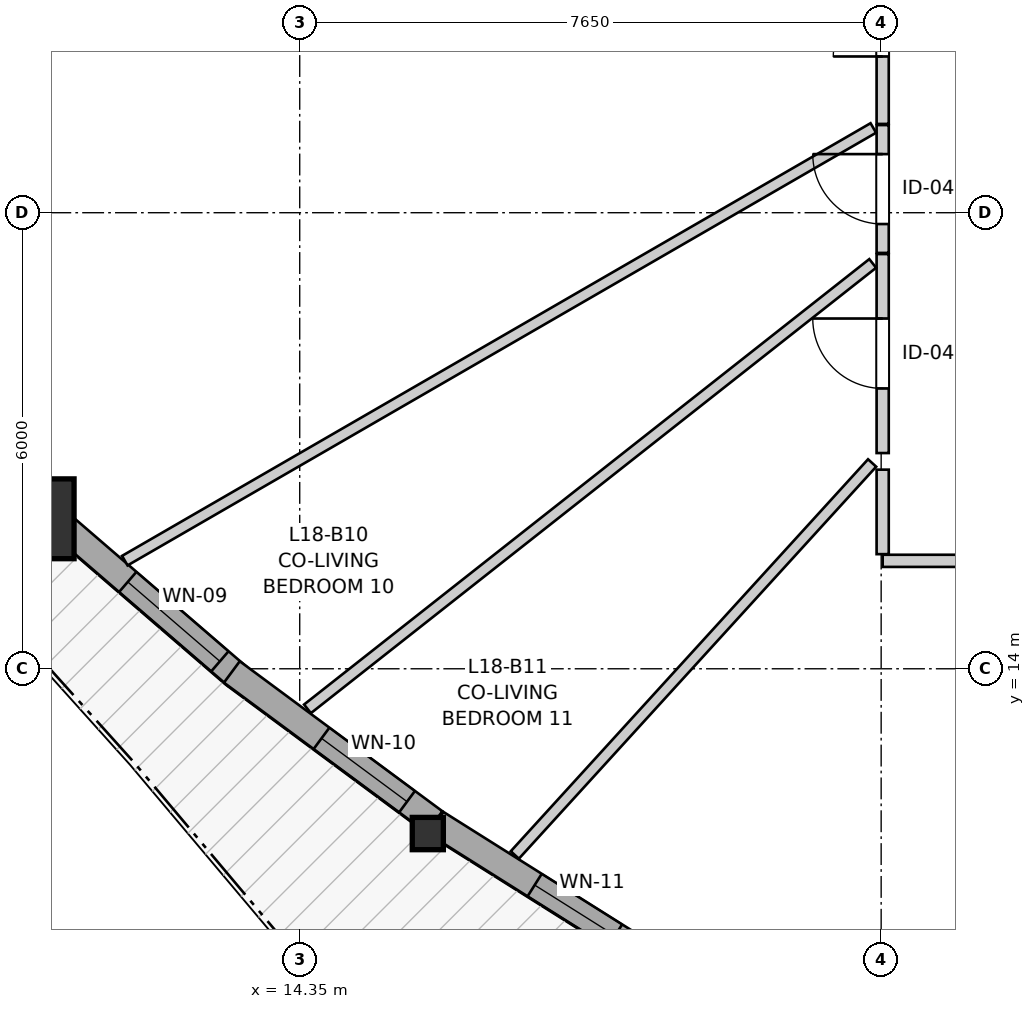
"""IFC4 building model, lengths in metres.
Left out: names, types, materials, properties, quantities, classifications, styles, units other than length and angle.
Written with IfcOpenShell. Run it as: python <this file> out.ifc"""

import sys

from ifc_helpers import new_model, si_unit, direction, frame, frame_2d, origin, origin_2d, place, context, subcontext, project, spatial, rectangle, i_section, extrude, source, transform, mapped, element, fill, save


model = new_model("IFC4")
c1 = context("Model", 3, precision=1e-05, world=origin(), true_north=direction((0.0, 1.0)))
c2 = subcontext(c1, "Body", "Model", "MODEL_VIEW")
j1 = project(units=[si_unit("LENGTHUNIT", "METRE"), si_unit("PLANEANGLEUNIT", "RADIAN")], contexts=[c1])
p1 = place(None, origin())
s1 = spatial("IfcSite", under=j1, at=p1, CompositionType="ELEMENT")
p2 = place(p1, origin())
s2 = spatial("IfcBuilding", under=s1, at=p2, CompositionType="ELEMENT")
p3 = place(p2, frame((0.0, 0.0, 62.2)))
s3 = spatial("IfcBuildingStorey", under=s2, at=p3, CompositionType="ELEMENT", Elevation=62.2)
m1 = source(origin(), c2, "Body", "SweptSolid", [
    extrude(rectangle(XDim=1.05, YDim=1.05, at=origin_2d()), origin(), (0.0, 0.0, 1.0), 2.9),
])
p4 = place(p3, frame((10.856, 15.973, 0.0), z_axis=(0.0, 0.0, 1.0), x_axis=(1.0, 0.0, 0.0)))
e1 = element("IfcColumn", 1, at=p4, inside=s3, PredefinedType="COLUMN", context=c2, shape_type="MappedRepresentation", body=[
    mapped(m1, transform((0.0, 0.0, 0.0), x_axis=(1.0, 0.0, 0.0), y_axis=(0.0, 1.0, 0.0), z_axis=(0.0, 0.0, 1.0), scale=1.0)),
])
m2 = source(origin(), c2, "Body", "SweptSolid", [
    extrude(i_section(OverallWidth=0.409, OverallDepth=0.425, WebThickness=0.03, FlangeThickness=0.048, FilletRadius=0.015, at=origin_2d()), origin(), (0.0, 0.0, 1.0), 2.9),
])
p5 = place(p3, frame((16.035, 11.832, 0.0), z_axis=(0.0, 0.0, 1.0), x_axis=(1.0, 0.0, 0.0)))
e2 = element("IfcColumn", 2, at=p5, inside=s3, PredefinedType="PILASTER", context=c2, shape_type="MappedRepresentation", body=[
    mapped(m2, transform((0.0, 0.0, 0.0), x_axis=(1.0, 0.0, 0.0), y_axis=(0.0, 1.0, 0.0), z_axis=(0.0, 0.0, 1.0), scale=1.0)),
])
p6 = place(p3, frame((11.198, 15.91, 0.0), z_axis=(0.0, 0.0, 1.0), x_axis=(0.757460062477, -0.652881500544, 0.0)))
e3 = element("IfcWall", 3, at=p6, inside=s3, PredefinedType="SOLIDWALL", context=c2, shape_type="SweptSolid", body=[
    extrude(rectangle(XDim=3.074, YDim=0.35, at=frame_2d((1.537, 0.0))), origin(), (0.0, 0.0, 1.0), 2.38),
])
p7 = place(p6, frame((1.175, 0.0, 0.82)))
e4 = element("IfcOpeningElement", 4, at=p7, cuts=e3, PredefinedType="OPENING", context=c2, shape_type="SweptSolid", body=[
    extrude(rectangle(XDim=1.6, YDim=1.35, at=frame_2d((0.8, 0.675))), frame((0.0, 0.185, 0.0), z_axis=(0.0, -1.0, 0.0), x_axis=(1.0, 0.0, 0.0)), (0.0, 0.0, 1.0), 0.37),
])
p8 = place(p3, frame((13.457, 13.958, 0.0), z_axis=(0.0, 0.0, 1.0), x_axis=(0.803790514758, -0.594912437578, 0.0)))
e5 = element("IfcWall", 5, at=p8, inside=s3, PredefinedType="SOLIDWALL", context=c2, shape_type="SweptSolid", body=[
    extrude(rectangle(XDim=3.317, YDim=0.35, at=frame_2d((1.659, 0.0))), origin(), (0.0, 0.0, 1.0), 2.38),
])
p9 = place(p8, frame((1.468, 0.0, 0.82)))
e6 = element("IfcOpeningElement", 6, at=p9, cuts=e5, PredefinedType="OPENING", context=c2, shape_type="SweptSolid", body=[
    extrude(rectangle(XDim=1.4, YDim=1.35, at=frame_2d((0.7, 0.675))), frame((0.0, 0.185, 0.0), z_axis=(0.0, -1.0, 0.0), x_axis=(1.0, 0.0, 0.0)), (0.0, 0.0, 1.0), 0.37),
])
p10 = place(p3, frame((16.146, 11.97, 0.0), z_axis=(0.0, 0.0, 1.0), x_axis=(0.846405860611, -0.532538373381, 0.0)))
e7 = element("IfcWall", 7, at=p10, inside=s3, PredefinedType="SOLIDWALL", context=c2, shape_type="SweptSolid", body=[
    extrude(rectangle(XDim=3.298, YDim=0.35, at=frame_2d((1.649, 0.0))), origin(), (0.0, 0.0, 1.0), 2.38),
])
p11 = place(p10, frame((1.531, 0.0, 0.82)))
e8 = element("IfcOpeningElement", 8, at=p11, cuts=e7, PredefinedType="OPENING", context=c2, shape_type="SweptSolid", body=[
    extrude(rectangle(XDim=1.25, YDim=1.35, at=frame_2d((0.625, 0.675))), frame((0.0, 0.185, 0.0), z_axis=(0.0, -1.0, 0.0), x_axis=(1.0, 0.0, 0.0)), (0.0, 0.0, 1.0), 0.37),
])
p12 = place(p3, frame((28.596, 15.42, 0.0), z_axis=(0.0, 0.0, 1.0), x_axis=(-1.0, 0.0, 0.0)))
e9 = element("IfcWall", 9, at=p12, inside=s3, PredefinedType="PARTITIONING", context=c2, shape_type="SweptSolid", body=[
    extrude(rectangle(XDim=6.576, YDim=0.16, at=frame_2d((3.288, 0.0))), origin(), (0.0, 0.0, 1.0), 2.9),
])
p13 = place(p12, frame((2.646, 0.0, 0.0)))
e10 = element("IfcOpeningElement", 10, at=p13, cuts=e9, PredefinedType="OPENING", context=c2, shape_type="SweptSolid", body=[
    extrude(rectangle(XDim=1.3, YDim=2.1, at=frame_2d((0.65, 1.05))), frame((0.0, 0.09, 0.0), z_axis=(0.0, -1.0, 0.0), x_axis=(1.0, 0.0, 0.0)), (0.0, 0.0, 1.0), 0.18),
])
p14 = place(p3, frame((22.02, 21.168, 0.0), z_axis=(0.0, 0.0, 1.0), x_axis=(0.0, 1.0, 0.0)))
e11 = element("IfcWall", 11, at=p14, inside=s3, PredefinedType="PARTITIONING", context=c2, shape_type="SweptSolid", body=[
    extrude(rectangle(XDim=2.982, YDim=0.16, at=frame_2d((1.491, 0.0))), origin(), (0.0, 0.0, 1.0), 2.9),
])
p15 = place(p14, frame((0.887, 0.0, 0.0)))
e12 = element("IfcOpeningElement", 12, at=p15, cuts=e11, PredefinedType="OPENING", context=c2, shape_type="SweptSolid", body=[
    extrude(rectangle(XDim=1.3, YDim=2.1, at=frame_2d((0.65, 1.05))), frame((0.0, 0.09, 0.0), z_axis=(0.0, -1.0, 0.0), x_axis=(1.0, 0.0, 0.0)), (0.0, 0.0, 1.0), 0.18),
])
p16 = place(p3, frame((22.02, 16.838, 0.0), z_axis=(0.0, 0.0, 1.0), x_axis=(0.0, 1.0, 0.0)))
e13 = element("IfcWall", 13, at=p16, inside=s3, PredefinedType="PARTITIONING", context=c2, shape_type="SweptSolid", body=[
    extrude(rectangle(XDim=2.618, YDim=0.16, at=frame_2d((1.309, 0.0))), origin(), (0.0, 0.0, 1.0), 2.9),
])
p17 = place(p16, frame((0.85, 0.0, 0.0)))
e14 = element("IfcOpeningElement", 14, at=p17, cuts=e13, PredefinedType="OPENING", context=c2, shape_type="SweptSolid", body=[
    extrude(rectangle(XDim=0.92, YDim=2.1, at=frame_2d((0.46, 1.05))), frame((0.0, 0.09, 0.0), z_axis=(0.0, -1.0, 0.0), x_axis=(1.0, 0.0, 0.0)), (0.0, 0.0, 1.0), 0.18),
])
p18 = place(p3, frame((22.02, 19.471, 0.0), z_axis=(0.0, 0.0, 1.0), x_axis=(0.0, 1.0, 0.0)))
e15 = element("IfcWall", 15, at=p18, inside=s3, PredefinedType="PARTITIONING", context=c2, shape_type="SweptSolid", body=[
    extrude(rectangle(XDim=1.682, YDim=0.16, at=frame_2d((0.841, 0.0))), origin(), (0.0, 0.0, 1.0), 2.9),
])
p19 = place(p18, frame((0.38, 0.0, 0.0)))
e16 = element("IfcOpeningElement", 16, at=p19, cuts=e15, PredefinedType="OPENING", context=c2, shape_type="SweptSolid", body=[
    extrude(rectangle(XDim=0.92, YDim=2.1, at=frame_2d((0.46, 1.05))), frame((0.0, 0.09, 0.0), z_axis=(0.0, -1.0, 0.0), x_axis=(1.0, 0.0, 0.0)), (0.0, 0.0, 1.0), 0.18),
])
p20 = place(p3, frame((12.049, 15.422, 0.0), z_axis=(0.0, 0.0, 1.0), x_axis=(0.865775806306, 0.500432066534, 0.0)))
e17 = element("IfcWall", 17, at=p20, inside=s3, PredefinedType="PARTITIONING", context=c2, shape_type="SweptSolid", body=[
    extrude(rectangle(XDim=11.375, YDim=0.145, at=frame_2d((5.688, 0.0))), origin(), (0.0, 0.0, 1.0), 2.9),
])
p21 = place(p3, frame((14.452, 13.473, 0.0), z_axis=(0.0, 0.0, 1.0), x_axis=(0.785461283481, 0.618910794988, 0.0)))
e18 = element("IfcWall", 18, at=p21, inside=s3, PredefinedType="PARTITIONING", context=c2, shape_type="SweptSolid", body=[
    extrude(rectangle(XDim=9.468, YDim=0.145, at=frame_2d((4.734, 0.0))), origin(), (0.0, 0.0, 1.0), 2.9),
])
p22 = place(p3, frame((17.18, 11.55, 0.0), z_axis=(0.0, 0.0, 1.0), x_axis=(0.673657773225, 0.739043438895, 0.0)))
e19 = element("IfcWall", 19, at=p22, inside=s3, PredefinedType="PARTITIONING", context=c2, shape_type="SweptSolid", body=[
    extrude(rectangle(XDim=6.979, YDim=0.145, at=frame_2d((3.489, 0.0))), origin(), (0.0, 0.0, 1.0), 2.9),
])
p23 = place(p3, frame((22.02, 15.508, 0.0), z_axis=(0.0, 0.0, 1.0), x_axis=(0.0, 1.0, 0.0)))
e20 = element("IfcWall", 20, at=p23, inside=s3, PredefinedType="PARTITIONING", context=c2, shape_type="SweptSolid", body=[
    extrude(rectangle(XDim=1.112, YDim=0.16, at=frame_2d((0.556, 0.0))), origin(), (0.0, 0.0, 1.0), 2.9),
])
m3 = source(origin(), c2, "Body", "SweptSolid", [
    extrude(rectangle(XDim=1.6, YDim=1.35, at=frame_2d((0.8, 0.675))), frame((0.0, 0.03, 0.0), z_axis=(0.0, -1.0, 0.0), x_axis=(1.0, 0.0, 0.0)), (0.0, 0.0, 1.0), 0.06),
])
p24 = place(p7, origin())
e21 = element("IfcWindow", 21, at=p24, inside=s3, PartitioningType="SINGLE_PANEL", PredefinedType="WINDOW", context=c2, shape_type="MappedRepresentation", body=[
    mapped(m3, transform((0.0, 0.0, 0.0), x_axis=(1.0, 0.0, 0.0), y_axis=(0.0, 1.0, 0.0), z_axis=(0.0, 0.0, 1.0), scale=1.0)),
])
fill(e4, e21)
m4 = source(origin(), c2, "Body", "SweptSolid", [
    extrude(rectangle(XDim=1.4, YDim=1.35, at=frame_2d((0.7, 0.675))), frame((0.0, 0.03, 0.0), z_axis=(0.0, -1.0, 0.0), x_axis=(1.0, 0.0, 0.0)), (0.0, 0.0, 1.0), 0.06),
])
p25 = place(p9, origin())
e22 = element("IfcWindow", 22, at=p25, inside=s3, PartitioningType="SINGLE_PANEL", PredefinedType="WINDOW", context=c2, shape_type="MappedRepresentation", body=[
    mapped(m4, transform((0.0, 0.0, 0.0), x_axis=(1.0, 0.0, 0.0), y_axis=(0.0, 1.0, 0.0), z_axis=(0.0, 0.0, 1.0), scale=1.0)),
])
fill(e6, e22)
m5 = source(origin(), c2, "Body", "SweptSolid", [
    extrude(rectangle(XDim=1.25, YDim=1.35, at=frame_2d((0.625, 0.675))), frame((0.0, 0.03, 0.0), z_axis=(0.0, -1.0, 0.0), x_axis=(1.0, 0.0, 0.0)), (0.0, 0.0, 1.0), 0.06),
])
p26 = place(p11, origin())
e23 = element("IfcWindow", 23, at=p26, inside=s3, PartitioningType="SINGLE_PANEL", PredefinedType="WINDOW", context=c2, shape_type="MappedRepresentation", body=[
    mapped(m5, transform((0.0, 0.0, 0.0), x_axis=(1.0, 0.0, 0.0), y_axis=(0.0, 1.0, 0.0), z_axis=(0.0, 0.0, 1.0), scale=1.0)),
])
fill(e8, e23)
m6 = source(origin(), c2, "Body", "SweptSolid", [
    extrude(rectangle(XDim=1.3, YDim=2.1, at=frame_2d((0.65, 1.05))), frame((0.0, 0.025, 0.0), z_axis=(0.0, -1.0, 0.0), x_axis=(1.0, 0.0, 0.0)), (0.0, 0.0, 1.0), 0.05),
])
p27 = place(p15, origin())
e24 = element("IfcDoor", 24, at=p27, inside=s3, OperationType="DOUBLE_DOOR_SINGLE_SWING", PredefinedType="DOOR", context=c2, shape_type="MappedRepresentation", body=[
    mapped(m6, transform((0.0, 0.0, 0.0), x_axis=(1.0, 0.0, 0.0), y_axis=(0.0, 1.0, 0.0), z_axis=(0.0, 0.0, 1.0), scale=1.0)),
])
fill(e12, e24)
m7 = source(origin(), c2, "Body", "SweptSolid", [
    extrude(rectangle(XDim=0.92, YDim=2.1, at=frame_2d((0.46, 1.05))), frame((0.0, 0.025, 0.0), z_axis=(0.0, -1.0, 0.0), x_axis=(1.0, 0.0, 0.0)), (0.0, 0.0, 1.0), 0.05),
])
p28 = place(p17, origin())
e25 = element("IfcDoor", 25, at=p28, inside=s3, OperationType="SINGLE_SWING_RIGHT", PredefinedType="DOOR", context=c2, shape_type="MappedRepresentation", body=[
    mapped(m7, transform((0.0, 0.0, 0.0), x_axis=(1.0, 0.0, 0.0), y_axis=(0.0, 1.0, 0.0), z_axis=(0.0, 0.0, 1.0), scale=1.0)),
])
fill(e14, e25)
p29 = place(p19, origin())
e26 = element("IfcDoor", 26, at=p29, inside=s3, OperationType="SINGLE_SWING_RIGHT", PredefinedType="DOOR", context=c2, shape_type="MappedRepresentation", body=[
    mapped(m7, transform((0.0, 0.0, 0.0), x_axis=(1.0, 0.0, 0.0), y_axis=(0.0, 1.0, 0.0), z_axis=(0.0, 0.0, 1.0), scale=1.0)),
])
fill(e16, e26)
save(model, sys.argv[1])
